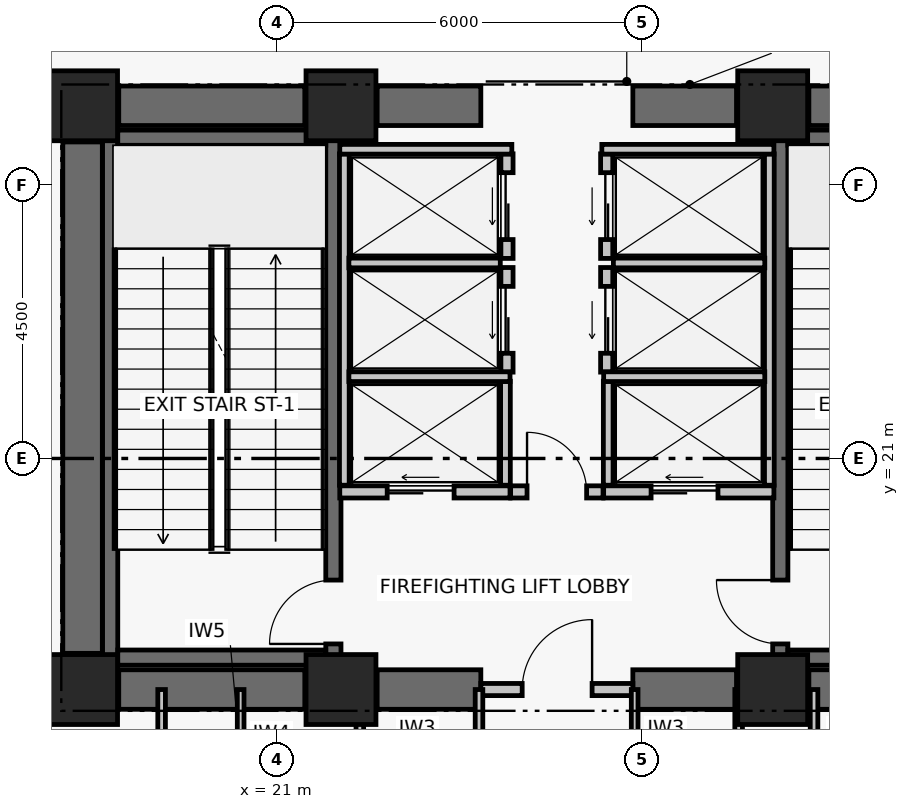
"""IFC4 building model, lengths in metres.
Left out: names, types, materials, properties, quantities, classifications, styles, units other than length and angle.
Written with IfcOpenShell. Run it as: python <this file> out.ifc"""

import sys

from ifc_helpers import new_model, si_unit, direction, frame, frame_2d, origin, origin_2d, place, context, subcontext, project, spatial, rectangle, extrude, element, fill, save


model = new_model("IFC4")
c1 = context("Model", 3, precision=1e-05, world=origin(), true_north=direction((0.0, 1.0)))
c2 = subcontext(c1, "Body", "Model", "MODEL_VIEW")
j1 = project(units=[si_unit("LENGTHUNIT", "METRE"), si_unit("PLANEANGLEUNIT", "RADIAN")], contexts=[c1])
p1 = place(None, origin())
s1 = spatial("IfcSite", under=j1, at=p1, CompositionType="ELEMENT")
p2 = place(p1, origin())
s2 = spatial("IfcBuilding", under=s1, at=p2, CompositionType="ELEMENT")
p3 = place(p2, frame((0.0, 0.0, 7.2)))
s3 = spatial("IfcBuildingStorey", under=s2, at=p3, CompositionType="ELEMENT", Elevation=7.2)
for number, where, z_axis, x_axis in (
    (1, (17.8, 17.2, 0.0), (0.0, 0.0, 1.0), (1.0, 0.0, 0.0)),
    (2, (22.05, 17.2, 0.0), (0.0, 0.0, 1.0), (1.0, 0.0, 0.0)),
    (3, (29.15, 17.2, 0.0), (0.0, 0.0, 1.0), (1.0, 0.0, 0.0)),
    (4, (17.8, 26.8, 0.0), (0.0, 0.0, 1.0), (1.0, 0.0, 0.0)),
    (5, (22.05, 26.8, 0.0), (0.0, 0.0, 1.0), (1.0, 0.0, 0.0)),
    (6, (29.15, 26.8, 0.0), (0.0, 0.0, 1.0), (1.0, 0.0, 0.0)),
):
    element("IfcColumn", number, at=place(p3, frame(where, z_axis=z_axis, x_axis=x_axis)), inside=s3, PredefinedType="COLUMN", context=c2, shape_type="SweptSolid", body=[
        extrude(rectangle(XDim=1.15, YDim=1.15, at=origin_2d()), origin(), (0.0, 0.0, 1.0), 4.8),
    ])
p4 = place(p3, frame((18.395, 17.2, 0.0), z_axis=(0.0, 0.0, 1.0), x_axis=(1.0, 0.0, 0.0)))
e7 = element("IfcWall", 7, at=p4, inside=s3, PredefinedType="SHEAR", context=c2, shape_type="SweptSolid", body=[
    extrude(rectangle(XDim=3.06, YDim=0.65, at=frame_2d((1.53, 0.0))), origin(), (0.0, 0.0, 1.0), 4.48),
])
p5 = place(p3, frame((22.645, 17.2, 0.0), z_axis=(0.0, 0.0, 1.0), x_axis=(1.0, 0.0, 0.0)))
e8 = element("IfcWall", 8, at=p5, inside=s3, PredefinedType="SHEAR", context=c2, shape_type="SweptSolid", body=[
    extrude(rectangle(XDim=1.705, YDim=0.65, at=frame_2d((0.853, 0.0))), origin(), (0.0, 0.0, 1.0), 4.48),
])
p6 = place(p3, frame((26.85, 17.2, 0.0), z_axis=(0.0, 0.0, 1.0), x_axis=(1.0, 0.0, 0.0)))
e9 = element("IfcWall", 9, at=p6, inside=s3, PredefinedType="SHEAR", context=c2, shape_type="SweptSolid", body=[
    extrude(rectangle(XDim=1.705, YDim=0.65, at=frame_2d((0.853, 0.0))), origin(), (0.0, 0.0, 1.0), 4.48),
])
p7 = place(p3, frame((29.745, 17.2, 0.0), z_axis=(0.0, 0.0, 1.0), x_axis=(1.0, 0.0, 0.0)))
e10 = element("IfcWall", 10, at=p7, inside=s3, PredefinedType="SHEAR", context=c2, shape_type="SweptSolid", body=[
    extrude(rectangle(XDim=3.06, YDim=0.65, at=frame_2d((1.53, 0.0))), origin(), (0.0, 0.0, 1.0), 4.48),
])
p8 = place(p3, frame((18.395, 26.8, 0.0), z_axis=(0.0, 0.0, 1.0), x_axis=(1.0, 0.0, 0.0)))
e11 = element("IfcWall", 11, at=p8, inside=s3, PredefinedType="SHEAR", context=c2, shape_type="SweptSolid", body=[
    extrude(rectangle(XDim=3.06, YDim=0.65, at=frame_2d((1.53, 0.0))), origin(), (0.0, 0.0, 1.0), 4.48),
])
p9 = place(p3, frame((22.645, 26.8, 0.0), z_axis=(0.0, 0.0, 1.0), x_axis=(1.0, 0.0, 0.0)))
e12 = element("IfcWall", 12, at=p9, inside=s3, PredefinedType="SHEAR", context=c2, shape_type="SweptSolid", body=[
    extrude(rectangle(XDim=1.705, YDim=0.65, at=frame_2d((0.853, 0.0))), origin(), (0.0, 0.0, 1.0), 4.48),
])
p10 = place(p3, frame((26.85, 26.8, 0.0), z_axis=(0.0, 0.0, 1.0), x_axis=(1.0, 0.0, 0.0)))
e13 = element("IfcWall", 13, at=p10, inside=s3, PredefinedType="SHEAR", context=c2, shape_type="SweptSolid", body=[
    extrude(rectangle(XDim=1.705, YDim=0.65, at=frame_2d((0.853, 0.0))), origin(), (0.0, 0.0, 1.0), 4.48),
])
p11 = place(p3, frame((29.745, 26.8, 0.0), z_axis=(0.0, 0.0, 1.0), x_axis=(1.0, 0.0, 0.0)))
e14 = element("IfcWall", 14, at=p11, inside=s3, PredefinedType="SHEAR", context=c2, shape_type="SweptSolid", body=[
    extrude(rectangle(XDim=3.06, YDim=0.65, at=frame_2d((1.53, 0.0))), origin(), (0.0, 0.0, 1.0), 4.48),
])
p12 = place(p3, frame((17.8, 17.795, 0.0), z_axis=(0.0, 0.0, 1.0), x_axis=(0.0, 1.0, 0.0)))
e15 = element("IfcWall", 15, at=p12, inside=s3, PredefinedType="SHEAR", context=c2, shape_type="SweptSolid", body=[
    extrude(rectangle(XDim=8.41, YDim=0.65, at=frame_2d((4.205, 0.0))), origin(), (0.0, 0.0, 1.0), 4.48),
])
p13 = place(p3, frame((18.254, 17.6, 0.0), z_axis=(0.0, 0.0, 1.0), x_axis=(0.0, 1.0, 0.0)))
e16 = element("IfcWall", 16, at=p13, inside=s3, PredefinedType="SHEAR", context=c2, shape_type="SweptSolid", body=[
    extrude(rectangle(XDim=8.8, YDim=0.25, at=frame_2d((4.4, 0.0))), origin(), (0.0, 0.0, 1.0), 4.48),
])
p14 = place(p3, frame((21.925, 17.6, 0.0), z_axis=(0.0, 0.0, 1.0), x_axis=(0.0, 1.0, 0.0)))
e17 = element("IfcWall", 17, at=p14, inside=s3, PredefinedType="SHEAR", context=c2, shape_type="SweptSolid", body=[
    extrude(rectangle(XDim=8.8, YDim=0.25, at=frame_2d((4.4, 0.0))), origin(), (0.0, 0.0, 1.0), 4.48),
])
p15 = place(p14, frame((0.35, 0.0, 0.0)))
e18 = element("IfcOpeningElement", 18, at=p15, cuts=e17, PredefinedType="OPENING", context=c2, shape_type="SweptSolid", body=[
    extrude(rectangle(XDim=1.05, YDim=2.08, at=frame_2d((0.525, 1.04))), frame((0.0, 0.135, 0.0), z_axis=(0.0, -1.0, 0.0), x_axis=(1.0, 0.0, 0.0)), (0.0, 0.0, 1.0), 0.27),
])
for number, where, z_axis, x_axis in (
    (19, (18.379, 17.725, 0.0), (0.0, 0.0, 1.0), (1.0, 0.0, 0.0)),
    (20, (18.379, 26.275, 0.0), (0.0, 0.0, 1.0), (1.0, 0.0, 0.0)),
):
    element("IfcWall", number, at=place(p3, frame(where, z_axis=z_axis, x_axis=x_axis)), inside=s3, PredefinedType="SHEAR", context=c2, shape_type="SweptSolid", body=[
        extrude(rectangle(XDim=3.421, YDim=0.25, at=frame_2d((1.71, 0.0))), origin(), (0.0, 0.0, 1.0), 4.48),
    ])
p16 = place(p3, frame((29.275, 17.6, 0.0), z_axis=(0.0, 0.0, 1.0), x_axis=(0.0, 1.0, 0.0)))
e21 = element("IfcWall", 21, at=p16, inside=s3, PredefinedType="SHEAR", context=c2, shape_type="SweptSolid", body=[
    extrude(rectangle(XDim=8.8, YDim=0.25, at=frame_2d((4.4, 0.0))), origin(), (0.0, 0.0, 1.0), 4.48),
])
p17 = place(p16, frame((0.35, 0.0, 0.0)))
e22 = element("IfcOpeningElement", 22, at=p17, cuts=e21, PredefinedType="OPENING", context=c2, shape_type="SweptSolid", body=[
    extrude(rectangle(XDim=1.05, YDim=2.08, at=frame_2d((0.525, 1.04))), frame((0.0, 0.135, 0.0), z_axis=(0.0, -1.0, 0.0), x_axis=(1.0, 0.0, 0.0)), (0.0, 0.0, 1.0), 0.27),
])
for number, where, z_axis, x_axis in (
    (23, (29.4, 17.725, 0.0), (0.0, 0.0, 1.0), (1.0, 0.0, 0.0)),
    (24, (29.4, 26.275, 0.0), (0.0, 0.0, 1.0), (1.0, 0.0, 0.0)),
):
    element("IfcWall", number, at=place(p3, frame(where, z_axis=z_axis, x_axis=x_axis)), inside=s3, PredefinedType="SHEAR", context=c2, shape_type="SweptSolid", body=[
        extrude(rectangle(XDim=3.421, YDim=0.25, at=frame_2d((1.71, 0.0))), origin(), (0.0, 0.0, 1.0), 4.48),
    ])
p18 = place(p3, frame((24.35, 17.2, 0.0), z_axis=(0.0, 0.0, 1.0), x_axis=(1.0, 0.0, 0.0)))
e25 = element("IfcWall", 25, at=p18, inside=s3, PredefinedType="PARTITIONING", context=c2, shape_type="SweptSolid", body=[
    extrude(rectangle(XDim=2.5, YDim=0.2, at=frame_2d((1.25, 0.0))), origin(), (0.0, 0.0, 1.0), 3.61),
])
p19 = place(p18, frame((0.68, 0.0, 0.0)))
e26 = element("IfcOpeningElement", 26, at=p19, cuts=e25, PredefinedType="OPENING", context=c2, shape_type="SweptSolid", body=[
    extrude(rectangle(XDim=1.15, YDim=2.08, at=frame_2d((0.575, 1.04))), frame((0.0, 0.11, 0.0), z_axis=(0.0, -1.0, 0.0), x_axis=(1.0, 0.0, 0.0)), (0.0, 0.0, 1.0), 0.22),
])
p20 = place(p3, frame((24.84, 20.45, 0.0), z_axis=(0.0, 0.0, 1.0), x_axis=(1.0, 0.0, 0.0)))
e27 = element("IfcWall", 27, at=p20, inside=s3, PredefinedType="PARTITIONING", context=c2, shape_type="SweptSolid", body=[
    extrude(rectangle(XDim=1.52, YDim=0.2, at=frame_2d((0.76, 0.0))), origin(), (0.0, 0.0, 1.0), 4.48),
])
p21 = place(p20, frame((0.27, 0.0, 0.0)))
e28 = element("IfcOpeningElement", 28, at=p21, cuts=e27, PredefinedType="OPENING", context=c2, shape_type="SweptSolid", body=[
    extrude(rectangle(XDim=0.98, YDim=2.06, at=frame_2d((0.49, 1.03))), frame((0.0, 0.11, 0.0), z_axis=(0.0, -1.0, 0.0), x_axis=(1.0, 0.0, 0.0)), (0.0, 0.0, 1.0), 0.22),
])
p22 = place(p3, frame((22.03, 20.45, 0.0), z_axis=(0.0, 0.0, 1.0), x_axis=(1.0, 0.0, 0.0)))
e29 = element("IfcWall", 29, at=p22, inside=s3, PredefinedType="PARTITIONING", context=c2, shape_type="SweptSolid", body=[
    extrude(rectangle(XDim=2.8, YDim=0.2, at=frame_2d((1.4, 0.0))), origin(), (0.0, 0.0, 1.0), 4.48),
])
p23 = place(p22, frame((0.78, 0.0, 0.0)))
e30 = element("IfcOpeningElement", 30, at=p23, cuts=e29, PredefinedType="OPENING", context=c2, shape_type="SweptSolid", body=[
    extrude(rectangle(XDim=1.1, YDim=2.08, at=frame_2d((0.55, 1.04))), frame((0.0, 0.11, 0.0), z_axis=(0.0, -1.0, 0.0), x_axis=(1.0, 0.0, 0.0)), (0.0, 0.0, 1.0), 0.22),
])
p24 = place(p3, frame((26.37, 20.45, 0.0), z_axis=(0.0, 0.0, 1.0), x_axis=(1.0, 0.0, 0.0)))
e31 = element("IfcWall", 31, at=p24, inside=s3, PredefinedType="PARTITIONING", context=c2, shape_type="SweptSolid", body=[
    extrude(rectangle(XDim=2.8, YDim=0.2, at=frame_2d((1.4, 0.0))), origin(), (0.0, 0.0, 1.0), 4.48),
])
p25 = place(p24, frame((0.78, 0.0, 0.0)))
e32 = element("IfcOpeningElement", 32, at=p25, cuts=e31, PredefinedType="OPENING", context=c2, shape_type="SweptSolid", body=[
    extrude(rectangle(XDim=1.1, YDim=2.08, at=frame_2d((0.55, 1.04))), frame((0.0, 0.11, 0.0), z_axis=(0.0, -1.0, 0.0), x_axis=(1.0, 0.0, 0.0)), (0.0, 0.0, 1.0), 0.22),
])
p26 = place(p3, frame((24.78, 22.42, 0.0), z_axis=(0.0, 0.0, 1.0), x_axis=(0.0, 1.0, 0.0)))
e33 = element("IfcWall", 33, at=p26, inside=s3, PredefinedType="PARTITIONING", context=c2, shape_type="SweptSolid", body=[
    extrude(rectangle(XDim=1.72, YDim=0.2, at=frame_2d((0.86, 0.0))), origin(), (0.0, 0.0, 1.0), 4.48),
])
p27 = place(p26, frame((0.31, 0.0, 0.0)))
e34 = element("IfcOpeningElement", 34, at=p27, cuts=e33, PredefinedType="OPENING", context=c2, shape_type="SweptSolid", body=[
    extrude(rectangle(XDim=1.1, YDim=2.08, at=frame_2d((0.55, 1.04))), frame((0.0, 0.11, 0.0), z_axis=(0.0, -1.0, 0.0), x_axis=(1.0, 0.0, 0.0)), (0.0, 0.0, 1.0), 0.22),
])
p28 = place(p3, frame((24.78, 24.29, 0.0), z_axis=(0.0, 0.0, 1.0), x_axis=(0.0, 1.0, 0.0)))
e35 = element("IfcWall", 35, at=p28, inside=s3, PredefinedType="PARTITIONING", context=c2, shape_type="SweptSolid", body=[
    extrude(rectangle(XDim=1.72, YDim=0.2, at=frame_2d((0.86, 0.0))), origin(), (0.0, 0.0, 1.0), 4.48),
])
p29 = place(p28, frame((0.31, 0.0, 0.0)))
e36 = element("IfcOpeningElement", 36, at=p29, cuts=e35, PredefinedType="OPENING", context=c2, shape_type="SweptSolid", body=[
    extrude(rectangle(XDim=1.1, YDim=2.08, at=frame_2d((0.55, 1.04))), frame((0.0, 0.11, 0.0), z_axis=(0.0, -1.0, 0.0), x_axis=(1.0, 0.0, 0.0)), (0.0, 0.0, 1.0), 0.22),
])
p30 = place(p3, frame((26.42, 22.42, 0.0), z_axis=(0.0, 0.0, 1.0), x_axis=(0.0, 1.0, 0.0)))
e37 = element("IfcWall", 37, at=p30, inside=s3, PredefinedType="PARTITIONING", context=c2, shape_type="SweptSolid", body=[
    extrude(rectangle(XDim=1.72, YDim=0.2, at=frame_2d((0.86, 0.0))), origin(), (0.0, 0.0, 1.0), 4.48),
])
p31 = place(p30, frame((0.31, 0.0, 0.0)))
e38 = element("IfcOpeningElement", 38, at=p31, cuts=e37, PredefinedType="OPENING", context=c2, shape_type="SweptSolid", body=[
    extrude(rectangle(XDim=1.1, YDim=2.08, at=frame_2d((0.55, 1.04))), frame((0.0, 0.11, 0.0), z_axis=(0.0, -1.0, 0.0), x_axis=(1.0, 0.0, 0.0)), (0.0, 0.0, 1.0), 0.22),
])
p32 = place(p3, frame((26.42, 24.29, 0.0), z_axis=(0.0, 0.0, 1.0), x_axis=(0.0, 1.0, 0.0)))
e39 = element("IfcWall", 39, at=p32, inside=s3, PredefinedType="PARTITIONING", context=c2, shape_type="SweptSolid", body=[
    extrude(rectangle(XDim=1.72, YDim=0.2, at=frame_2d((0.86, 0.0))), origin(), (0.0, 0.0, 1.0), 4.48),
])
p33 = place(p32, frame((0.31, 0.0, 0.0)))
e40 = element("IfcOpeningElement", 40, at=p33, cuts=e39, PredefinedType="OPENING", context=c2, shape_type="SweptSolid", body=[
    extrude(rectangle(XDim=1.1, YDim=2.08, at=frame_2d((0.55, 1.04))), frame((0.0, 0.11, 0.0), z_axis=(0.0, -1.0, 0.0), x_axis=(1.0, 0.0, 0.0)), (0.0, 0.0, 1.0), 0.22),
])
p34 = place(p3, frame((22.105, 20.56, 0.0), z_axis=(0.0, 0.0, 1.0), x_axis=(0.0, 1.0, 0.0)))
e41 = element("IfcWall", 41, at=p34, inside=s3, PredefinedType="PARTITIONING", context=c2, shape_type="SweptSolid", body=[
    extrude(rectangle(XDim=5.45, YDim=0.16, at=frame_2d((2.725, 0.0))), origin(), (0.0, 0.0, 1.0), 4.48),
])
p35 = place(p3, frame((24.755, 20.56, 0.0), z_axis=(0.0, 0.0, 1.0), x_axis=(0.0, 1.0, 0.0)))
e42 = element("IfcWall", 42, at=p35, inside=s3, PredefinedType="PARTITIONING", context=c2, shape_type="SweptSolid", body=[
    extrude(rectangle(XDim=1.71, YDim=0.16, at=frame_2d((0.855, 0.0))), origin(), (0.0, 0.0, 1.0), 4.48),
])
p36 = place(p3, frame((22.18, 22.345, 0.0), z_axis=(0.0, 0.0, 1.0), x_axis=(1.0, 0.0, 0.0)))
e43 = element("IfcWall", 43, at=p36, inside=s3, PredefinedType="PARTITIONING", context=c2, shape_type="SweptSolid", body=[
    extrude(rectangle(XDim=2.65, YDim=0.16, at=frame_2d((1.325, 0.0))), origin(), (0.0, 0.0, 1.0), 4.48),
])
p37 = place(p3, frame((22.18, 24.215, 0.0), z_axis=(0.0, 0.0, 1.0), x_axis=(1.0, 0.0, 0.0)))
e44 = element("IfcWall", 44, at=p37, inside=s3, PredefinedType="PARTITIONING", context=c2, shape_type="SweptSolid", body=[
    extrude(rectangle(XDim=2.49, YDim=0.16, at=frame_2d((1.245, 0.0))), origin(), (0.0, 0.0, 1.0), 4.48),
])
p38 = place(p3, frame((22.03, 26.085, 0.0), z_axis=(0.0, 0.0, 1.0), x_axis=(1.0, 0.0, 0.0)))
e45 = element("IfcWall", 45, at=p38, inside=s3, PredefinedType="PARTITIONING", context=c2, shape_type="SweptSolid", body=[
    extrude(rectangle(XDim=2.83, YDim=0.16, at=frame_2d((1.415, 0.0))), origin(), (0.0, 0.0, 1.0), 4.48),
])
p39 = place(p3, frame((29.095, 20.56, 0.0), z_axis=(0.0, 0.0, 1.0), x_axis=(0.0, 1.0, 0.0)))
e46 = element("IfcWall", 46, at=p39, inside=s3, PredefinedType="PARTITIONING", context=c2, shape_type="SweptSolid", body=[
    extrude(rectangle(XDim=5.45, YDim=0.16, at=frame_2d((2.725, 0.0))), origin(), (0.0, 0.0, 1.0), 4.48),
])
p40 = place(p3, frame((26.445, 20.56, 0.0), z_axis=(0.0, 0.0, 1.0), x_axis=(0.0, 1.0, 0.0)))
e47 = element("IfcWall", 47, at=p40, inside=s3, PredefinedType="PARTITIONING", context=c2, shape_type="SweptSolid", body=[
    extrude(rectangle(XDim=1.71, YDim=0.16, at=frame_2d((0.855, 0.0))), origin(), (0.0, 0.0, 1.0), 4.48),
])
p41 = place(p3, frame((26.37, 22.345, 0.0), z_axis=(0.0, 0.0, 1.0), x_axis=(1.0, 0.0, 0.0)))
e48 = element("IfcWall", 48, at=p41, inside=s3, PredefinedType="PARTITIONING", context=c2, shape_type="SweptSolid", body=[
    extrude(rectangle(XDim=2.65, YDim=0.16, at=frame_2d((1.325, 0.0))), origin(), (0.0, 0.0, 1.0), 4.48),
])
p42 = place(p3, frame((26.53, 24.215, 0.0), z_axis=(0.0, 0.0, 1.0), x_axis=(1.0, 0.0, 0.0)))
e49 = element("IfcWall", 49, at=p42, inside=s3, PredefinedType="PARTITIONING", context=c2, shape_type="SweptSolid", body=[
    extrude(rectangle(XDim=2.49, YDim=0.16, at=frame_2d((1.245, 0.0))), origin(), (0.0, 0.0, 1.0), 4.48),
])
p43 = place(p3, frame((26.34, 26.085, 0.0), z_axis=(0.0, 0.0, 1.0), x_axis=(1.0, 0.0, 0.0)))
e50 = element("IfcWall", 50, at=p43, inside=s3, PredefinedType="PARTITIONING", context=c2, shape_type="SweptSolid", body=[
    extrude(rectangle(XDim=2.83, YDim=0.16, at=frame_2d((1.415, 0.0))), origin(), (0.0, 0.0, 1.0), 4.48),
])
p44 = place(p3, frame((19.1, 14.95, 0.0), z_axis=(0.0, 0.0, 1.0), x_axis=(0.0, 1.0, 0.0)))
e51 = element("IfcWall", 51, at=p44, inside=s3, PredefinedType="PARTITIONING", context=c2, shape_type="SweptSolid", body=[
    extrude(rectangle(XDim=2.25, YDim=0.125, at=frame_2d((1.125, 0.0))), origin(), (0.0, 0.0, 1.0), 3.61),
])
p45 = place(p3, frame((20.4, 14.95, 0.0), z_axis=(0.0, 0.0, 1.0), x_axis=(0.0, 1.0, 0.0)))
e52 = element("IfcWall", 52, at=p45, inside=s3, PredefinedType="PARTITIONING", context=c2, shape_type="SweptSolid", body=[
    extrude(rectangle(XDim=2.25, YDim=0.11, at=frame_2d((1.125, 0.0))), origin(), (0.0, 0.0, 1.0), 3.61),
])
p46 = place(p3, frame((22.36, 14.95, 0.0), z_axis=(0.0, 0.0, 1.0), x_axis=(0.0, 1.0, 0.0)))
e53 = element("IfcWall", 53, at=p46, inside=s3, PredefinedType="PARTITIONING", context=c2, shape_type="SweptSolid", body=[
    extrude(rectangle(XDim=2.25, YDim=0.125, at=frame_2d((1.125, 0.0))), origin(), (0.0, 0.0, 1.0), 3.56),
])
p47 = place(p3, frame((24.32, 14.95, 0.0), z_axis=(0.0, 0.0, 1.0), x_axis=(0.0, 1.0, 0.0)))
e54 = element("IfcWall", 54, at=p47, inside=s3, PredefinedType="PARTITIONING", context=c2, shape_type="SweptSolid", body=[
    extrude(rectangle(XDim=2.25, YDim=0.125, at=frame_2d((1.125, 0.0))), origin(), (0.0, 0.0, 1.0), 3.61),
])
p48 = place(p3, frame((26.88, 14.95, 0.0), z_axis=(0.0, 0.0, 1.0), x_axis=(0.0, 1.0, 0.0)))
e55 = element("IfcWall", 55, at=p48, inside=s3, PredefinedType="PARTITIONING", context=c2, shape_type="SweptSolid", body=[
    extrude(rectangle(XDim=2.25, YDim=0.11, at=frame_2d((1.125, 0.0))), origin(), (0.0, 0.0, 1.0), 3.61),
])
for number, where, z_axis, x_axis in (
    (56, (28.59, 14.95, 0.0), (0.0, 0.0, 1.0), (0.0, 1.0, 0.0)),
    (57, (29.83, 14.95, 0.0), (0.0, 0.0, 1.0), (0.0, 1.0, 0.0)),
):
    element("IfcWall", number, at=place(p3, frame(where, z_axis=z_axis, x_axis=x_axis)), inside=s3, PredefinedType="PARTITIONING", context=c2, shape_type="SweptSolid", body=[
        extrude(rectangle(XDim=2.25, YDim=0.125, at=frame_2d((1.125, 0.0))), origin(), (0.0, 0.0, 1.0), 3.61),
    ])
p49 = place(p15, origin())
e58 = element("IfcDoor", 58, at=p49, inside=s3, OperationType="SINGLE_SWING_LEFT", PredefinedType="DOOR", context=c2, shape_type="SweptSolid", body=[
    extrude(rectangle(XDim=1.05, YDim=2.08, at=frame_2d((0.525, 1.04))), frame((0.0, 0.025, 0.0), z_axis=(0.0, -1.0, 0.0), x_axis=(1.0, 0.0, 0.0)), (0.0, 0.0, 1.0), 0.05),
])
fill(e18, e58)
p50 = place(p17, origin())
e59 = element("IfcDoor", 59, at=p50, inside=s3, OperationType="SINGLE_SWING_RIGHT", PredefinedType="DOOR", context=c2, shape_type="SweptSolid", body=[
    extrude(rectangle(XDim=1.05, YDim=2.08, at=frame_2d((0.525, 1.04))), frame((0.0, 0.025, 0.0), z_axis=(0.0, -1.0, 0.0), x_axis=(1.0, 0.0, 0.0)), (0.0, 0.0, 1.0), 0.05),
])
fill(e22, e59)
p51 = place(p19, origin())
e60 = element("IfcDoor", 60, at=p51, inside=s3, OperationType="SINGLE_SWING_RIGHT", PredefinedType="DOOR", context=c2, shape_type="SweptSolid", body=[
    extrude(rectangle(XDim=1.15, YDim=2.08, at=frame_2d((0.575, 1.04))), frame((0.0, 0.025, 0.0), z_axis=(0.0, -1.0, 0.0), x_axis=(1.0, 0.0, 0.0)), (0.0, 0.0, 1.0), 0.05),
])
fill(e26, e60)
p52 = place(p21, origin())
e61 = element("IfcDoor", 61, at=p52, inside=s3, OperationType="SINGLE_SWING_LEFT", PredefinedType="DOOR", context=c2, shape_type="SweptSolid", body=[
    extrude(rectangle(XDim=0.98, YDim=2.06, at=frame_2d((0.49, 1.03))), frame((0.0, 0.025, 0.0), z_axis=(0.0, -1.0, 0.0), x_axis=(1.0, 0.0, 0.0)), (0.0, 0.0, 1.0), 0.05),
])
fill(e28, e61)
p53 = place(p23, origin())
e62 = element("IfcDoor", 62, at=p53, inside=s3, OperationType="DOUBLE_DOOR_SLIDING", PredefinedType="DOOR", context=c2, shape_type="SweptSolid", body=[
    extrude(rectangle(XDim=1.1, YDim=2.08, at=frame_2d((0.55, 1.04))), frame((0.0, 0.025, 0.0), z_axis=(0.0, -1.0, 0.0), x_axis=(1.0, 0.0, 0.0)), (0.0, 0.0, 1.0), 0.05),
])
fill(e30, e62)
p54 = place(p25, origin())
e63 = element("IfcDoor", 63, at=p54, inside=s3, OperationType="DOUBLE_DOOR_SLIDING", PredefinedType="DOOR", context=c2, shape_type="SweptSolid", body=[
    extrude(rectangle(XDim=1.1, YDim=2.08, at=frame_2d((0.55, 1.04))), frame((0.0, 0.025, 0.0), z_axis=(0.0, -1.0, 0.0), x_axis=(1.0, 0.0, 0.0)), (0.0, 0.0, 1.0), 0.05),
])
fill(e32, e63)
p55 = place(p27, origin())
e64 = element("IfcDoor", 64, at=p55, inside=s3, OperationType="DOUBLE_DOOR_SLIDING", PredefinedType="DOOR", context=c2, shape_type="SweptSolid", body=[
    extrude(rectangle(XDim=1.1, YDim=2.08, at=frame_2d((0.55, 1.04))), frame((0.0, 0.025, 0.0), z_axis=(0.0, -1.0, 0.0), x_axis=(1.0, 0.0, 0.0)), (0.0, 0.0, 1.0), 0.05),
])
fill(e34, e64)
p56 = place(p29, origin())
e65 = element("IfcDoor", 65, at=p56, inside=s3, OperationType="DOUBLE_DOOR_SLIDING", PredefinedType="DOOR", context=c2, shape_type="SweptSolid", body=[
    extrude(rectangle(XDim=1.1, YDim=2.08, at=frame_2d((0.55, 1.04))), frame((0.0, 0.025, 0.0), z_axis=(0.0, -1.0, 0.0), x_axis=(1.0, 0.0, 0.0)), (0.0, 0.0, 1.0), 0.05),
])
fill(e36, e65)
p57 = place(p31, origin())
e66 = element("IfcDoor", 66, at=p57, inside=s3, OperationType="DOUBLE_DOOR_SLIDING", PredefinedType="DOOR", context=c2, shape_type="SweptSolid", body=[
    extrude(rectangle(XDim=1.1, YDim=2.08, at=frame_2d((0.55, 1.04))), frame((0.0, 0.025, 0.0), z_axis=(0.0, -1.0, 0.0), x_axis=(1.0, 0.0, 0.0)), (0.0, 0.0, 1.0), 0.05),
])
fill(e38, e66)
p58 = place(p33, origin())
e67 = element("IfcDoor", 67, at=p58, inside=s3, OperationType="DOUBLE_DOOR_SLIDING", PredefinedType="DOOR", context=c2, shape_type="SweptSolid", body=[
    extrude(rectangle(XDim=1.1, YDim=2.08, at=frame_2d((0.55, 1.04))), frame((0.0, 0.025, 0.0), z_axis=(0.0, -1.0, 0.0), x_axis=(1.0, 0.0, 0.0)), (0.0, 0.0, 1.0), 0.05),
])
fill(e40, e67)
save(model, sys.argv[1])
